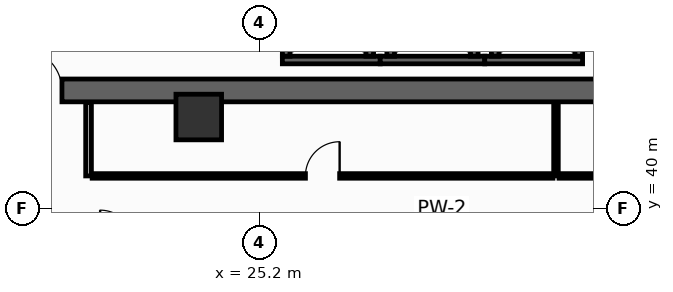
"""IFC4 building model, lengths in metres.
Left out: names, types, materials, properties, quantities, classifications, styles, units other than length and angle.
Written with IfcOpenShell. Run it as: python <this file> out.ifc"""

import sys

from ifc_helpers import new_model, si_unit, direction, frame, frame_2d, origin, origin_2d, place, context, subcontext, project, spatial, rectangle, hollow_rectangle, extrude, element, fill, save


model = new_model("IFC4")
c1 = context("Model", 3, precision=1e-05, world=origin(), true_north=direction((0.0, 1.0)))
c2 = subcontext(c1, "Body", "Model", "MODEL_VIEW")
j1 = project(units=[si_unit("LENGTHUNIT", "METRE"), si_unit("PLANEANGLEUNIT", "RADIAN")], contexts=[c1])
p1 = place(None, origin())
s1 = spatial("IfcSite", under=j1, at=p1, CompositionType="ELEMENT")
p2 = place(p1, origin())
s2 = spatial("IfcBuilding", under=s1, at=p2, CompositionType="ELEMENT")
p3 = place(p2, frame((0.0, 0.0, 69.2)))
s3 = spatial("IfcBuildingStorey", under=s2, at=p3, CompositionType="ELEMENT", Elevation=69.2)
p4 = place(p3, frame((13.5, 43.1, 0.0), z_axis=(0.0, 0.0, 1.0), x_axis=(1.0, 0.0, 0.0)))
e1 = element("IfcWall", 1, at=p4, inside=s3, PredefinedType="SHEAR", context=c2, shape_type="SweptSolid", body=[
    extrude(rectangle(XDim=32.9, YDim=0.6, at=frame_2d((16.45, 0.0))), origin(), (0.0, 0.0, 1.0), 4.15),
])
p5 = place(p4, frame((5.4, 0.0, 0.0)))
e2 = element("IfcOpeningElement", 2, at=p5, cuts=e1, PredefinedType="OPENING", context=c2, shape_type="SweptSolid", body=[
    extrude(rectangle(XDim=1.1, YDim=2.15, at=frame_2d((0.55, 1.075))), frame((0.0, 0.31, 0.0), z_axis=(0.0, -1.0, 0.0), x_axis=(1.0, 0.0, 0.0)), (0.0, 0.0, 1.0), 0.62),
])
p6 = place(p4, frame((25.6, 0.0, 0.0)))
e3 = element("IfcOpeningElement", 3, at=p6, cuts=e1, PredefinedType="OPENING", context=c2, shape_type="SweptSolid", body=[
    extrude(rectangle(XDim=1.1, YDim=2.15, at=frame_2d((0.55, 1.075))), frame((0.0, 0.31, 0.0), z_axis=(0.0, -1.0, 0.0), x_axis=(1.0, 0.0, 0.0)), (0.0, 0.0, 1.0), 0.62),
])
p7 = place(p3, frame((23.6, 42.4, 0.0), z_axis=(0.0, 0.0, 1.0), x_axis=(1.0, 0.0, 0.0)))
e4 = element("IfcColumn", 4, at=p7, inside=s3, PredefinedType="COLUMN", context=c2, shape_type="SweptSolid", body=[
    extrude(hollow_rectangle(XDim=1.2, YDim=1.2, WallThickness=0.055, at=origin_2d()), origin(), (0.0, 0.0, 1.0), 4.4),
])
p8 = place(p3, frame((25.8, 43.9, 0.0), z_axis=(0.0, 0.0, 1.0), x_axis=(1.0, 0.0, 0.0)))
e5 = element("IfcWall", 5, at=p8, inside=s3, PredefinedType="SHEAR", context=c2, shape_type="SweptSolid", body=[
    extrude(rectangle(XDim=2.575, YDim=0.2, at=frame_2d((1.288, 0.0))), origin(), (0.0, 0.0, 1.0), 4.15),
])
for number, where, z_axis, x_axis in (
    (6, (25.9, 44.0, 0.0), (0.0, 0.0, 1.0), (0.0, 1.0, 0.0)),
    (7, (28.1, 44.0, 0.0), (0.0, 0.0, 1.0), (0.0, 1.0, 0.0)),
):
    element("IfcWall", number, at=place(p3, frame(where, z_axis=z_axis, x_axis=x_axis)), inside=s3, PredefinedType="SHEAR", context=c2, shape_type="SweptSolid", body=[
        extrude(rectangle(XDim=2.3, YDim=0.2, at=frame_2d((1.15, 0.0))), origin(), (0.0, 0.0, 1.0), 4.15),
    ])
p9 = place(p3, frame((28.375, 43.9, 0.0), z_axis=(0.0, 0.0, 1.0), x_axis=(1.0, 0.0, 0.0)))
e8 = element("IfcWall", 8, at=p9, inside=s3, PredefinedType="SHEAR", context=c2, shape_type="SweptSolid", body=[
    extrude(rectangle(XDim=2.75, YDim=0.2, at=frame_2d((1.375, 0.0))), origin(), (0.0, 0.0, 1.0), 4.15),
])
for number, where, z_axis, x_axis in (
    (9, (28.65, 44.0, 0.0), (0.0, 0.0, 1.0), (0.0, 1.0, 0.0)),
    (10, (30.85, 44.0, 0.0), (0.0, 0.0, 1.0), (0.0, 1.0, 0.0)),
):
    element("IfcWall", number, at=place(p3, frame(where, z_axis=z_axis, x_axis=x_axis)), inside=s3, PredefinedType="SHEAR", context=c2, shape_type="SweptSolid", body=[
        extrude(rectangle(XDim=2.3, YDim=0.2, at=frame_2d((1.15, 0.0))), origin(), (0.0, 0.0, 1.0), 4.15),
    ])
p10 = place(p3, frame((31.125, 43.9, 0.0), z_axis=(0.0, 0.0, 1.0), x_axis=(1.0, 0.0, 0.0)))
e11 = element("IfcWall", 11, at=p10, inside=s3, PredefinedType="SHEAR", context=c2, shape_type="SweptSolid", body=[
    extrude(rectangle(XDim=2.575, YDim=0.2, at=frame_2d((1.288, 0.0))), origin(), (0.0, 0.0, 1.0), 4.15),
])
for number, where, z_axis, x_axis in (
    (12, (31.4, 44.0, 0.0), (0.0, 0.0, 1.0), (0.0, 1.0, 0.0)),
    (13, (33.6, 44.0, 0.0), (0.0, 0.0, 1.0), (0.0, 1.0, 0.0)),
):
    element("IfcWall", number, at=place(p3, frame(where, z_axis=z_axis, x_axis=x_axis)), inside=s3, PredefinedType="SHEAR", context=c2, shape_type="SweptSolid", body=[
        extrude(rectangle(XDim=2.3, YDim=0.2, at=frame_2d((1.15, 0.0))), origin(), (0.0, 0.0, 1.0), 4.15),
    ])
p11 = place(p3, frame((20.7, 40.85, 0.0), z_axis=(0.0, 0.0, 1.0), x_axis=(0.0, 1.0, 0.0)))
e14 = element("IfcWall", 14, at=p11, inside=s3, PredefinedType="PARTITIONING", context=c2, shape_type="SweptSolid", body=[
    extrude(rectangle(XDim=1.93, YDim=0.15, at=frame_2d((0.965, 0.0))), origin(), (0.0, 0.0, 1.0), 4.15),
])
p12 = place(p3, frame((33.0, 40.85, 0.0), z_axis=(0.0, 0.0, 1.0), x_axis=(0.0, 1.0, 0.0)))
e15 = element("IfcWall", 15, at=p12, inside=s3, PredefinedType="PARTITIONING", context=c2, shape_type="SweptSolid", body=[
    extrude(rectangle(XDim=1.93, YDim=0.12, at=frame_2d((0.965, 0.0))), origin(), (0.0, 0.0, 1.0), 3.335),
])
p13 = place(p3, frame((20.795, 40.85, 0.0), z_axis=(0.0, 0.0, 1.0), x_axis=(1.0, 0.0, 0.0)))
e16 = element("IfcWall", 16, at=p13, inside=s3, PredefinedType="PARTITIONING", context=c2, shape_type="SweptSolid", body=[
    extrude(rectangle(XDim=12.125, YDim=0.12, at=frame_2d((6.062, 0.0))), origin(), (0.0, 0.0, 1.0), 3.335),
])
p14 = place(p13, frame((5.612, 0.0, 0.0)))
e17 = element("IfcOpeningElement", 17, at=p14, cuts=e16, PredefinedType="OPENING", context=c2, shape_type="SweptSolid", body=[
    extrude(rectangle(XDim=0.9, YDim=2.1, at=frame_2d((0.45, 1.05))), frame((0.0, 0.07, 0.0), z_axis=(0.0, -1.0, 0.0), x_axis=(1.0, 0.0, 0.0)), (0.0, 0.0, 1.0), 0.14),
])
p15 = place(p3, frame((33.08, 40.85, 0.0), z_axis=(0.0, 0.0, 1.0), x_axis=(1.0, 0.0, 0.0)))
e18 = element("IfcWall", 18, at=p15, inside=s3, PredefinedType="PARTITIONING", context=c2, shape_type="SweptSolid", body=[
    extrude(rectangle(XDim=5.625, YDim=0.12, at=frame_2d((2.812, 0.0))), origin(), (0.0, 0.0, 1.0), 3.335),
])
p16 = place(p15, frame((1.483, 0.0, 0.0)))
e19 = element("IfcOpeningElement", 19, at=p16, cuts=e18, PredefinedType="OPENING", context=c2, shape_type="SweptSolid", body=[
    extrude(rectangle(XDim=0.9, YDim=2.1, at=frame_2d((0.45, 1.05))), frame((0.0, 0.07, 0.0), z_axis=(0.0, -1.0, 0.0), x_axis=(1.0, 0.0, 0.0)), (0.0, 0.0, 1.0), 0.14),
])
p17 = place(p5, origin())
e20 = element("IfcDoor", 20, at=p17, inside=s3, OperationType="SINGLE_SWING_LEFT", PredefinedType="DOOR", context=c2, shape_type="SweptSolid", body=[
    extrude(rectangle(XDim=1.1, YDim=2.15, at=frame_2d((0.55, 1.075))), frame((0.0, 0.025, 0.0), z_axis=(0.0, -1.0, 0.0), x_axis=(1.0, 0.0, 0.0)), (0.0, 0.0, 1.0), 0.05),
])
fill(e2, e20)
p18 = place(p14, origin())
e21 = element("IfcDoor", 21, at=p18, inside=s3, OperationType="SINGLE_SWING_RIGHT", PredefinedType="DOOR", context=c2, shape_type="SweptSolid", body=[
    extrude(rectangle(XDim=0.9, YDim=2.1, at=frame_2d((0.45, 1.05))), frame((0.0, 0.025, 0.0), z_axis=(0.0, -1.0, 0.0), x_axis=(1.0, 0.0, 0.0)), (0.0, 0.0, 1.0), 0.05),
])
fill(e17, e21)
save(model, sys.argv[1])
